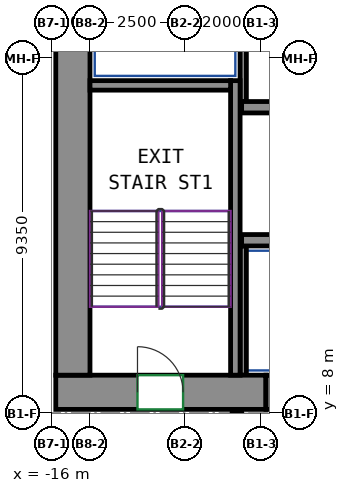
"""IFC4 building model, lengths in metres.
Left out: names, types, materials, properties, quantities, classifications, styles, units other than length and angle.
Written with IfcOpenShell. Run it as: python <this file> out.ifc"""

import sys

from ifc_helpers import new_model, si_unit, direction, frame, frame_2d, origin, place, context, subcontext, project, spatial, rectangle, extrude, source, transform, mapped, element, fill, save


model = new_model("IFC4")
c1 = context("Model", 3, precision=1e-05, world=origin(), true_north=direction((0.0, 1.0)))
c2 = subcontext(c1, "Body", "Model", "MODEL_VIEW")
j1 = project(units=[si_unit("LENGTHUNIT", "METRE"), si_unit("PLANEANGLEUNIT", "RADIAN")], contexts=[c1])
p1 = place(None, origin())
s1 = spatial("IfcSite", under=j1, at=p1, CompositionType="ELEMENT")
p2 = place(p1, origin())
s2 = spatial("IfcBuilding", under=s1, at=p2, CompositionType="ELEMENT")
p3 = place(p2, frame((0.0, 0.0, 171.9)))
s3 = spatial("IfcBuildingStorey", under=s2, at=p3, CompositionType="ELEMENT", Elevation=171.9)
m1 = source(origin(), c2, "Body", "SweptSolid", [
    extrude(rectangle(XDim=5.53, YDim=0.9, at=frame_2d((2.765, 0.0))), origin(), (0.0, 0.0, 1.0), 3.12),
])
p4 = place(p3, frame((-15.9, 8.55, 0.0), z_axis=(0.0, 0.0, 1.0), x_axis=(1.0, 0.0, 0.0)))
e1 = element("IfcWall", 1, at=p4, inside=s3, PredefinedType="SHEAR", context=c2, shape_type="MappedRepresentation", body=[
    mapped(m1, transform((0.0, 0.0, 0.0))),
])
p5 = place(p4, frame((2.15, 0.0, 0.0)))
e2 = element("IfcOpeningElement", 2, at=p5, cuts=e1, PredefinedType="OPENING", context=c2, shape_type="SweptSolid", body=[
    extrude(rectangle(XDim=1.2, YDim=2.1, at=frame_2d((0.6, 1.05))), frame((0.0, 0.46, 0.0), z_axis=(0.0, -1.0, 0.0), x_axis=(1.0, 0.0, 0.0)), (0.0, 0.0, 1.0), 0.92),
])
m2 = source(origin(), c2, "Body", "SweptSolid", [
    extrude(rectangle(XDim=12.0, YDim=0.9, at=frame_2d((6.0, 0.0))), origin(), (0.0, 0.0, 1.0), 3.12),
])
p6 = place(p3, frame((-15.45, 9.0, 0.0), z_axis=(0.0, 0.0, 1.0), x_axis=(0.0, 1.0, 0.0)))
e3 = element("IfcWall", 3, at=p6, inside=s3, PredefinedType="SHEAR", context=c2, shape_type="MappedRepresentation", body=[
    mapped(m2, transform((0.0, 0.0, 0.0))),
])
m3 = source(origin(), c2, "Body", "SweptSolid", [
    extrude(rectangle(XDim=7.75, YDim=0.25, at=frame_2d((3.875, 0.0))), origin(), (0.0, 0.0, 1.0), 3.12),
])
p7 = place(p3, frame((-11.175, 9.0, 0.0), z_axis=(0.0, 0.0, 1.0), x_axis=(0.0, 1.0, 0.0)))
e4 = element("IfcWall", 4, at=p7, inside=s3, PredefinedType="SHEAR", context=c2, shape_type="MappedRepresentation", body=[
    mapped(m3, transform((0.0, 0.0, 0.0))),
])
m4 = source(origin(), c2, "Body", "SweptSolid", [
    extrude(rectangle(XDim=3.7, YDim=0.25, at=frame_2d((1.85, 0.0))), origin(), (0.0, 0.0, 1.0), 3.12),
])
p8 = place(p3, frame((-15.0, 16.625, 0.0), z_axis=(0.0, 0.0, 1.0), x_axis=(1.0, 0.0, 0.0)))
e5 = element("IfcWall", 5, at=p8, inside=s3, PredefinedType="SHEAR", context=c2, shape_type="MappedRepresentation", body=[
    mapped(m4, transform((0.0, 0.0, 0.0))),
])
m5 = source(origin(), c2, "Body", "SweptSolid", [
    extrude(rectangle(XDim=6.0, YDim=0.3, at=frame_2d((3.0, 0.0))), origin(), (0.0, 0.0, 1.0), 3.12),
])
p9 = place(p3, frame((-11.01, 12.55, 0.0), z_axis=(0.0, 0.0, 1.0), x_axis=(1.0, 0.0, 0.0)))
e6 = element("IfcWall", 6, at=p9, inside=s3, PredefinedType="SHEAR", context=c2, shape_type="MappedRepresentation", body=[
    mapped(m5, transform((0.0, 0.0, 0.0))),
])
m6 = source(origin(), c2, "Body", "SweptSolid", [
    extrude(rectangle(XDim=14.04, YDim=0.3, at=frame_2d((7.02, 0.0))), origin(), (0.0, 0.0, 1.0), 3.12),
])
p10 = place(p3, frame((-11.01, 16.05, 0.0), z_axis=(0.0, 0.0, 1.0), x_axis=(1.0, 0.0, 0.0)))
e7 = element("IfcWall", 7, at=p10, inside=s3, PredefinedType="SHEAR", context=c2, shape_type="MappedRepresentation", body=[
    mapped(m6, transform((0.0, 0.0, 0.0))),
])
m7 = source(origin(), c2, "Body", "SweptSolid", [
    extrude(rectangle(XDim=4.8, YDim=0.165, at=frame_2d((2.4, 0.0))), origin(), (0.0, 0.0, 1.0), 3.12),
])
p11 = place(p3, frame((-10.968, 16.2, 0.0), z_axis=(0.0, 0.0, 1.0), x_axis=(0.0, 1.0, 0.0)))
e8 = element("IfcWall", 8, at=p11, inside=s3, PredefinedType="PARTITIONING", context=c2, shape_type="MappedRepresentation", body=[
    mapped(m7, transform((0.0, 0.0, 0.0))),
])
m8 = source(origin(), c2, "Body", "SweptSolid", [
    extrude(rectangle(XDim=3.4, YDim=0.165, at=frame_2d((1.7, 0.0))), origin(), (0.0, 0.0, 1.0), 3.12),
])
p12 = place(p3, frame((-10.968, 9.0, 0.0), z_axis=(0.0, 0.0, 1.0), x_axis=(0.0, 1.0, 0.0)))
e9 = element("IfcWall", 9, at=p12, inside=s3, PredefinedType="PARTITIONING", context=c2, shape_type="MappedRepresentation", body=[
    mapped(m8, transform((0.0, 0.0, 0.0))),
])
m9 = source(origin(), c2, "Body", "SweptSolid", [
    extrude(rectangle(XDim=1.4, YDim=0.9, at=frame_2d((0.7, 0.0))), origin(), (0.0, 0.0, 1.0), 2.7),
])
p13 = place(p3, frame((-10.37, 8.55, 0.0), z_axis=(0.0, 0.0, 1.0), x_axis=(1.0, 0.0, 0.0)))
e10 = element("IfcWall", 10, at=p13, inside=s3, PredefinedType="PARTITIONING", context=c2, shape_type="MappedRepresentation", body=[
    mapped(m9, transform((0.0, 0.0, 0.0))),
])
p14 = place(p13, frame((0.25, 0.0, 0.0)))
e11 = element("IfcOpeningElement", 11, at=p14, cuts=e10, PredefinedType="OPENING", context=c2, shape_type="SweptSolid", body=[
    extrude(rectangle(XDim=0.9, YDim=2.1, at=frame_2d((0.45, 1.05))), frame((0.0, 0.46, 0.0), z_axis=(0.0, -1.0, 0.0), x_axis=(1.0, 0.0, 0.0)), (0.0, 0.0, 1.0), 0.92),
])
p15 = place(p5, origin())
e12 = element("IfcDoor", 12, at=p15, inside=s3, OperationType="DOUBLE_DOOR_SINGLE_SWING", PredefinedType="DOOR", context=c2, shape_type="SweptSolid", body=[
    extrude(rectangle(XDim=1.2, YDim=2.1, at=frame_2d((0.6, 1.05))), frame((0.0, 0.355, 0.0), z_axis=(0.0, -1.0, 0.0), x_axis=(1.0, 0.0, 0.0)), (0.0, 0.0, 1.0), 0.05),
])
fill(e2, e12)
save(model, sys.argv[1])
